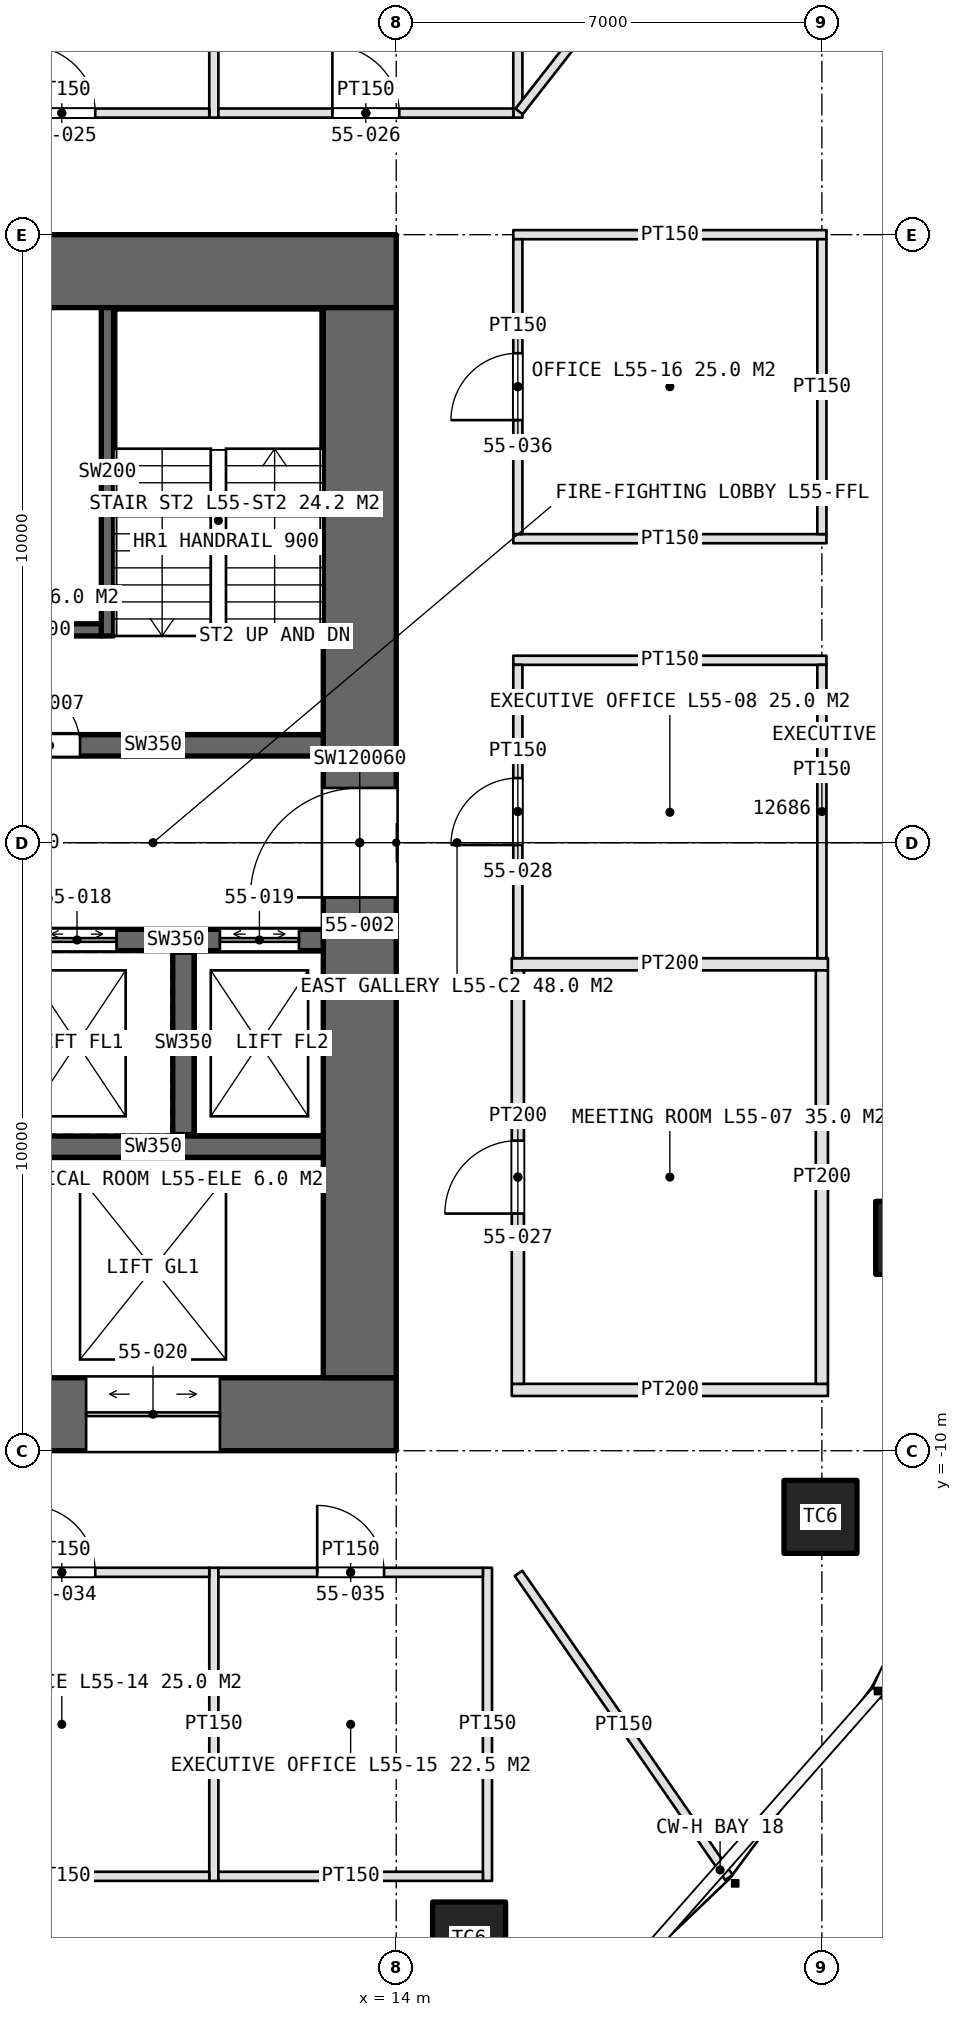
"""IFC4 building model, lengths in metres.
Left out: names, types, materials, properties, quantities, classifications, styles, units other than length and angle.
Written with IfcOpenShell. Run it as: python <this file> out.ifc"""

import sys

from ifc_helpers import new_model, si_unit, direction, frame, frame_2d, origin, origin_2d, place, context, subcontext, project, spatial, rectangle, extrude, element, fill, save


model = new_model("IFC4")
c1 = context("Model", 3, precision=1e-05, world=origin(), true_north=direction((0.0, 1.0)))
c2 = subcontext(c1, "Body", "Model", "MODEL_VIEW")
j1 = project(units=[si_unit("LENGTHUNIT", "METRE"), si_unit("PLANEANGLEUNIT", "RADIAN")], contexts=[c1])
p1 = place(None, origin())
s1 = spatial("IfcSite", under=j1, at=p1, CompositionType="ELEMENT")
p2 = place(p1, origin())
s2 = spatial("IfcBuilding", under=s1, at=p2, CompositionType="ELEMENT")
p3 = place(p2, frame((0.0, 0.0, 249.4)))
s3 = spatial("IfcBuildingStorey", under=s2, at=p3, CompositionType="ELEMENT", Elevation=249.4)
p4 = place(p3, frame((-14.0, -9.4, 0.0), z_axis=(0.0, 0.0, 1.0), x_axis=(1.0, 0.0, 0.0)))
e1 = element("IfcWall", 1, at=p4, inside=s3, PredefinedType="SHEAR", context=c2, shape_type="SweptSolid", body=[
    extrude(rectangle(XDim=28.0, YDim=1.2, at=frame_2d((14.0, 0.0))), origin(), (0.0, 0.0, 1.0), 4.2),
])
p5 = place(p4, frame((22.9, 0.0, 0.0)))
e2 = element("IfcOpeningElement", 2, at=p5, cuts=e1, PredefinedType="OPENING", context=c2, shape_type="SweptSolid", body=[
    extrude(rectangle(XDim=2.2, YDim=2.7, at=frame_2d((1.1, 1.35))), frame((0.0, 0.61, 0.0), z_axis=(0.0, -1.0, 0.0), x_axis=(1.0, 0.0, 0.0)), (0.0, 0.0, 1.0), 1.22),
])
p6 = place(p3, frame((14.0, 9.4, 0.0), z_axis=(0.0, 0.0, 1.0), x_axis=(-1.0, 0.0, 0.0)))
e3 = element("IfcWall", 3, at=p6, inside=s3, PredefinedType="SHEAR", context=c2, shape_type="SweptSolid", body=[
    extrude(rectangle(XDim=28.0, YDim=1.2, at=frame_2d((14.0, 0.0))), origin(), (0.0, 0.0, 1.0), 4.2),
])
p7 = place(p6, frame((24.0, 0.0, 0.0)))
e4 = element("IfcOpeningElement", 4, at=p7, cuts=e3, PredefinedType="OPENING", context=c2, shape_type="SweptSolid", body=[
    extrude(rectangle(XDim=1.0, YDim=2.4, at=frame_2d((0.5, 1.2))), frame((0.0, 0.61, 0.0), z_axis=(0.0, -1.0, 0.0), x_axis=(1.0, 0.0, 0.0)), (0.0, 0.0, 1.0), 1.22),
])
p8 = place(p3, frame((13.4, -8.8, 0.0), z_axis=(0.0, 0.0, 1.0), x_axis=(0.0, 1.0, 0.0)))
e5 = element("IfcWall", 5, at=p8, inside=s3, PredefinedType="SHEAR", context=c2, shape_type="SweptSolid", body=[
    extrude(rectangle(XDim=17.6, YDim=1.2, at=frame_2d((8.8, 0.0))), origin(), (0.0, 0.0, 1.0), 4.2),
])
p9 = place(p8, frame((7.9, 0.0, 0.0)))
e6 = element("IfcOpeningElement", 6, at=p9, cuts=e5, PredefinedType="OPENING", context=c2, shape_type="SweptSolid", body=[
    extrude(rectangle(XDim=1.8, YDim=2.4, at=frame_2d((0.9, 1.2))), frame((0.0, 0.61, 0.0), z_axis=(0.0, -1.0, 0.0), x_axis=(1.0, 0.0, 0.0)), (0.0, 0.0, 1.0), 1.22),
])
p10 = place(p3, frame((7.2, 1.6, 0.0), z_axis=(0.0, 0.0, 1.0), x_axis=(1.0, 0.0, 0.0)))
e7 = element("IfcWall", 7, at=p10, inside=s3, PredefinedType="SHEAR", context=c2, shape_type="SweptSolid", body=[
    extrude(rectangle(XDim=5.6, YDim=0.35, at=frame_2d((2.8, 0.0))), origin(), (0.0, 0.0, 1.0), 4.2),
])
p11 = place(p10, frame((0.6, 0.0, 0.0)))
e8 = element("IfcOpeningElement", 8, at=p11, cuts=e7, PredefinedType="OPENING", context=c2, shape_type="SweptSolid", body=[
    extrude(rectangle(XDim=1.0, YDim=2.4, at=frame_2d((0.5, 1.2))), frame((0.0, 0.185, 0.0), z_axis=(0.0, -1.0, 0.0), x_axis=(1.0, 0.0, 0.0)), (0.0, 0.0, 1.0), 0.37),
])
p12 = place(p3, frame((7.2, -1.6, 0.0), z_axis=(0.0, 0.0, 1.0), x_axis=(1.0, 0.0, 0.0)))
e9 = element("IfcWall", 9, at=p12, inside=s3, PredefinedType="SHEAR", context=c2, shape_type="SweptSolid", body=[
    extrude(rectangle(XDim=5.6, YDim=0.35, at=frame_2d((2.8, 0.0))), origin(), (0.0, 0.0, 1.0), 4.2),
])
p13 = place(p12, frame((0.9, 0.0, 0.0)))
e10 = element("IfcOpeningElement", 10, at=p13, cuts=e9, PredefinedType="OPENING", context=c2, shape_type="SweptSolid", body=[
    extrude(rectangle(XDim=1.3, YDim=2.4, at=frame_2d((0.65, 1.2))), frame((0.0, 0.185, 0.0), z_axis=(0.0, -1.0, 0.0), x_axis=(1.0, 0.0, 0.0)), (0.0, 0.0, 1.0), 0.37),
])
p14 = place(p12, frame((3.9, 0.0, 0.0)))
e11 = element("IfcOpeningElement", 11, at=p14, cuts=e9, PredefinedType="OPENING", context=c2, shape_type="SweptSolid", body=[
    extrude(rectangle(XDim=1.3, YDim=2.4, at=frame_2d((0.65, 1.2))), frame((0.0, 0.185, 0.0), z_axis=(0.0, -1.0, 0.0), x_axis=(1.0, 0.0, 0.0)), (0.0, 0.0, 1.0), 0.37),
])
p15 = place(p3, frame((10.5, -4.8, 0.0), z_axis=(0.0, 0.0, 1.0), x_axis=(0.0, 1.0, 0.0)))
e12 = element("IfcWall", 12, at=p15, inside=s3, PredefinedType="SHEAR", context=c2, shape_type="SweptSolid", body=[
    extrude(rectangle(XDim=3.0, YDim=0.35, at=frame_2d((1.5, 0.0))), origin(), (0.0, 0.0, 1.0), 4.2),
])
p16 = place(p3, frame((7.2, -5.0, 0.0), z_axis=(0.0, 0.0, 1.0), x_axis=(1.0, 0.0, 0.0)))
e13 = element("IfcWall", 13, at=p16, inside=s3, PredefinedType="SHEAR", context=c2, shape_type="SweptSolid", body=[
    extrude(rectangle(XDim=5.6, YDim=0.35, at=frame_2d((2.8, 0.0))), origin(), (0.0, 0.0, 1.0), 4.2),
])
for number, where, z_axis, x_axis in (
    (14, (15.198, -18.023, 0.0), (0.0, 0.0, 1.0), (1.0, 0.0, 0.0)),
    (15, (20.977, -11.088, 0.0), (0.0, 0.0, 1.0), (1.0, 0.0, 0.0)),
    (16, (22.485, -6.499, 0.0), (0.0, 0.0, 1.0), (1.0, 0.0, 0.0)),
):
    element("IfcColumn", number, at=place(p3, frame(where, z_axis=z_axis, x_axis=x_axis)), inside=s3, PredefinedType="COLUMN", context=c2, shape_type="SweptSolid", body=[
        extrude(rectangle(XDim=1.2, YDim=1.2, at=origin_2d()), origin(), (0.0, 0.0, 1.0), 4.2),
    ])
p17 = place(p3, frame((9.25, 3.4, 0.0), z_axis=(0.0, 0.0, 1.0), x_axis=(0.0, 1.0, 0.0)))
e17 = element("IfcWall", 17, at=p17, inside=s3, PredefinedType="SOLIDWALL", context=c2, shape_type="SweptSolid", body=[
    extrude(rectangle(XDim=5.4, YDim=0.2, at=frame_2d((2.7, 0.0))), origin(), (0.0, 0.0, 1.0), 4.2),
])
p18 = place(p3, frame((9.15, 3.5, 0.0), z_axis=(0.0, 0.0, 1.0), x_axis=(-1.0, 0.0, 0.0)))
e18 = element("IfcWall", 18, at=p18, inside=s3, PredefinedType="SOLIDWALL", context=c2, shape_type="SweptSolid", body=[
    extrude(rectangle(XDim=1.95, YDim=0.2, at=frame_2d((0.975, 0.0))), origin(), (0.0, 0.0, 1.0), 4.2),
])
for number, where, z_axis, x_axis in (
    (19, (11.0, 11.925, 0.0), (0.0, 0.0, 1.0), (0.0, 1.0, 0.0)),
    (20, (16.0, 11.925, 0.0), (0.0, 0.0, 1.0), (0.0, 1.0, 0.0)),
):
    element("IfcWall", number, at=place(p3, frame(where, z_axis=z_axis, x_axis=x_axis)), inside=s3, PredefinedType="PARTITIONING", context=c2, shape_type="SweptSolid", body=[
        extrude(rectangle(XDim=6.15, YDim=0.15, at=frame_2d((3.075, 0.0))), origin(), (0.0, 0.0, 1.0), 3.0),
    ])
p19 = place(p3, frame((6.075, 12.0, 0.0), z_axis=(0.0, 0.0, 1.0), x_axis=(1.0, 0.0, 0.0)))
e21 = element("IfcWall", 21, at=p19, inside=s3, PredefinedType="PARTITIONING", context=c2, shape_type="SweptSolid", body=[
    extrude(rectangle(XDim=4.85, YDim=0.15, at=frame_2d((2.425, 0.0))), origin(), (0.0, 0.0, 1.0), 3.0),
])
p20 = place(p19, frame((1.875, 0.0, 0.0)))
e22 = element("IfcOpeningElement", 22, at=p20, cuts=e21, PredefinedType="OPENING", context=c2, shape_type="SweptSolid", body=[
    extrude(rectangle(XDim=1.1, YDim=2.3, at=frame_2d((0.55, 1.15))), frame((0.0, 0.085, 0.0), z_axis=(0.0, -1.0, 0.0), x_axis=(1.0, 0.0, 0.0)), (0.0, 0.0, 1.0), 0.17),
])
p21 = place(p3, frame((11.075, 12.0, 0.0), z_axis=(0.0, 0.0, 1.0), x_axis=(1.0, 0.0, 0.0)))
e23 = element("IfcWall", 23, at=p21, inside=s3, PredefinedType="PARTITIONING", context=c2, shape_type="SweptSolid", body=[
    extrude(rectangle(XDim=4.85, YDim=0.15, at=frame_2d((2.425, 0.0))), origin(), (0.0, 0.0, 1.0), 3.0),
])
p22 = place(p21, frame((1.875, 0.0, 0.0)))
e24 = element("IfcOpeningElement", 24, at=p22, cuts=e23, PredefinedType="OPENING", context=c2, shape_type="SweptSolid", body=[
    extrude(rectangle(XDim=1.1, YDim=2.3, at=frame_2d((0.55, 1.15))), frame((0.0, 0.085, 0.0), z_axis=(0.0, -1.0, 0.0), x_axis=(1.0, 0.0, 0.0)), (0.0, 0.0, 1.0), 0.17),
])
for number, where, z_axis, x_axis in (
    (25, (15.9, -9.0, 0.0), (0.0, 0.0, 1.0), (1.0, 0.0, 0.0)),
    (26, (15.9, -2.0, 0.0), (0.0, 0.0, 1.0), (1.0, 0.0, 0.0)),
):
    element("IfcWall", number, at=place(p3, frame(where, z_axis=z_axis, x_axis=x_axis)), inside=s3, PredefinedType="PARTITIONING", context=c2, shape_type="SweptSolid", body=[
        extrude(rectangle(XDim=5.2, YDim=0.2, at=frame_2d((2.6, 0.0))), origin(), (0.0, 0.0, 1.0), 3.0),
    ])
p23 = place(p3, frame((15.925, 3.0, 0.0), z_axis=(0.0, 0.0, 1.0), x_axis=(1.0, 0.0, 0.0)))
e27 = element("IfcWall", 27, at=p23, inside=s3, PredefinedType="PARTITIONING", context=c2, shape_type="SweptSolid", body=[
    extrude(rectangle(XDim=5.15, YDim=0.15, at=frame_2d((2.575, 0.0))), origin(), (0.0, 0.0, 1.0), 3.0),
])
p24 = place(p3, frame((16.0, -8.9, 0.0), z_axis=(0.0, 0.0, 1.0), x_axis=(0.0, 1.0, 0.0)))
e28 = element("IfcWall", 28, at=p24, inside=s3, PredefinedType="PARTITIONING", context=c2, shape_type="SweptSolid", body=[
    extrude(rectangle(XDim=6.8, YDim=0.2, at=frame_2d((3.4, 0.0))), origin(), (0.0, 0.0, 1.0), 3.0),
])
p25 = place(p24, frame((2.8, 0.0, 0.0)))
e29 = element("IfcOpeningElement", 29, at=p25, cuts=e28, PredefinedType="OPENING", context=c2, shape_type="SweptSolid", body=[
    extrude(rectangle(XDim=1.2, YDim=2.4, at=frame_2d((0.6, 1.2))), frame((0.0, 0.11, 0.0), z_axis=(0.0, -1.0, 0.0), x_axis=(1.0, 0.0, 0.0)), (0.0, 0.0, 1.0), 0.22),
])
p26 = place(p3, frame((21.0, -8.9, 0.0), z_axis=(0.0, 0.0, 1.0), x_axis=(0.0, 1.0, 0.0)))
e30 = element("IfcWall", 30, at=p26, inside=s3, PredefinedType="PARTITIONING", context=c2, shape_type="SweptSolid", body=[
    extrude(rectangle(XDim=6.8, YDim=0.2, at=frame_2d((3.4, 0.0))), origin(), (0.0, 0.0, 1.0), 3.0),
])
p27 = place(p3, frame((16.0, -1.9, 0.0), z_axis=(0.0, 0.0, 1.0), x_axis=(0.0, 1.0, 0.0)))
e31 = element("IfcWall", 31, at=p27, inside=s3, PredefinedType="PARTITIONING", context=c2, shape_type="SweptSolid", body=[
    extrude(rectangle(XDim=4.825, YDim=0.15, at=frame_2d((2.413, 0.0))), origin(), (0.0, 0.0, 1.0), 3.0),
])
p28 = place(p27, frame((1.863, 0.0, 0.0)))
e32 = element("IfcOpeningElement", 32, at=p28, cuts=e31, PredefinedType="OPENING", context=c2, shape_type="SweptSolid", body=[
    extrude(rectangle(XDim=1.1, YDim=2.3, at=frame_2d((0.55, 1.15))), frame((0.0, 0.085, 0.0), z_axis=(0.0, -1.0, 0.0), x_axis=(1.0, 0.0, 0.0)), (0.0, 0.0, 1.0), 0.17),
])
p29 = place(p3, frame((21.0, -1.9, 0.0), z_axis=(0.0, 0.0, 1.0), x_axis=(0.0, 1.0, 0.0)))
e33 = element("IfcWall", 33, at=p29, inside=s3, PredefinedType="PARTITIONING", context=c2, shape_type="SweptSolid", body=[
    extrude(rectangle(XDim=4.825, YDim=0.15, at=frame_2d((2.413, 0.0))), origin(), (0.0, 0.0, 1.0), 3.0),
])
for number, where, z_axis, x_axis in (
    (34, (11.0, -11.925, 0.0), (0.0, 0.0, 1.0), (0.0, -1.0, 0.0)),
    (35, (15.5, -11.925, 0.0), (0.0, 0.0, 1.0), (0.0, -1.0, 0.0)),
):
    element("IfcWall", number, at=place(p3, frame(where, z_axis=z_axis, x_axis=x_axis)), inside=s3, PredefinedType="PARTITIONING", context=c2, shape_type="SweptSolid", body=[
        extrude(rectangle(XDim=5.15, YDim=0.15, at=frame_2d((2.575, 0.0))), origin(), (0.0, 0.0, 1.0), 3.0),
    ])
p30 = place(p3, frame((6.075, -12.0, 0.0), z_axis=(0.0, 0.0, 1.0), x_axis=(1.0, 0.0, 0.0)))
e36 = element("IfcWall", 36, at=p30, inside=s3, PredefinedType="PARTITIONING", context=c2, shape_type="SweptSolid", body=[
    extrude(rectangle(XDim=4.85, YDim=0.15, at=frame_2d((2.425, 0.0))), origin(), (0.0, 0.0, 1.0), 3.0),
])
p31 = place(p30, frame((1.875, 0.0, 0.0)))
e37 = element("IfcOpeningElement", 37, at=p31, cuts=e36, PredefinedType="OPENING", context=c2, shape_type="SweptSolid", body=[
    extrude(rectangle(XDim=1.1, YDim=2.3, at=frame_2d((0.55, 1.15))), frame((0.0, 0.085, 0.0), z_axis=(0.0, -1.0, 0.0), x_axis=(1.0, 0.0, 0.0)), (0.0, 0.0, 1.0), 0.17),
])
p32 = place(p3, frame((6.075, -17.0, 0.0), z_axis=(0.0, 0.0, 1.0), x_axis=(1.0, 0.0, 0.0)))
e38 = element("IfcWall", 38, at=p32, inside=s3, PredefinedType="PARTITIONING", context=c2, shape_type="SweptSolid", body=[
    extrude(rectangle(XDim=4.85, YDim=0.15, at=frame_2d((2.425, 0.0))), origin(), (0.0, 0.0, 1.0), 3.0),
])
p33 = place(p3, frame((11.075, -12.0, 0.0), z_axis=(0.0, 0.0, 1.0), x_axis=(1.0, 0.0, 0.0)))
e39 = element("IfcWall", 39, at=p33, inside=s3, PredefinedType="PARTITIONING", context=c2, shape_type="SweptSolid", body=[
    extrude(rectangle(XDim=4.35, YDim=0.15, at=frame_2d((2.175, 0.0))), origin(), (0.0, 0.0, 1.0), 3.0),
])
p34 = place(p33, frame((1.625, 0.0, 0.0)))
e40 = element("IfcOpeningElement", 40, at=p34, cuts=e39, PredefinedType="OPENING", context=c2, shape_type="SweptSolid", body=[
    extrude(rectangle(XDim=1.1, YDim=2.3, at=frame_2d((0.55, 1.15))), frame((0.0, 0.085, 0.0), z_axis=(0.0, -1.0, 0.0), x_axis=(1.0, 0.0, 0.0)), (0.0, 0.0, 1.0), 0.17),
])
p35 = place(p3, frame((11.075, -17.0, 0.0), z_axis=(0.0, 0.0, 1.0), x_axis=(1.0, 0.0, 0.0)))
e41 = element("IfcWall", 41, at=p35, inside=s3, PredefinedType="PARTITIONING", context=c2, shape_type="SweptSolid", body=[
    extrude(rectangle(XDim=4.35, YDim=0.15, at=frame_2d((2.175, 0.0))), origin(), (0.0, 0.0, 1.0), 3.0),
])
for number, where, z_axis, x_axis in (
    (42, (15.925, 5.0, 0.0), (0.0, 0.0, 1.0), (1.0, 0.0, 0.0)),
    (43, (15.925, 10.0, 0.0), (0.0, 0.0, 1.0), (1.0, 0.0, 0.0)),
):
    element("IfcWall", number, at=place(p3, frame(where, z_axis=z_axis, x_axis=x_axis)), inside=s3, PredefinedType="PARTITIONING", context=c2, shape_type="SweptSolid", body=[
        extrude(rectangle(XDim=5.15, YDim=0.15, at=frame_2d((2.575, 0.0))), origin(), (0.0, 0.0, 1.0), 3.0),
    ])
p36 = place(p3, frame((16.0, 5.075, 0.0), z_axis=(0.0, 0.0, 1.0), x_axis=(0.0, 1.0, 0.0)))
e44 = element("IfcWall", 44, at=p36, inside=s3, PredefinedType="PARTITIONING", context=c2, shape_type="SweptSolid", body=[
    extrude(rectangle(XDim=4.85, YDim=0.15, at=frame_2d((2.425, 0.0))), origin(), (0.0, 0.0, 1.0), 3.0),
])
p37 = place(p36, frame((1.875, 0.0, 0.0)))
e45 = element("IfcOpeningElement", 45, at=p37, cuts=e44, PredefinedType="OPENING", context=c2, shape_type="SweptSolid", body=[
    extrude(rectangle(XDim=1.1, YDim=2.3, at=frame_2d((0.55, 1.15))), frame((0.0, 0.085, 0.0), z_axis=(0.0, -1.0, 0.0), x_axis=(1.0, 0.0, 0.0)), (0.0, 0.0, 1.0), 0.17),
])
p38 = place(p3, frame((21.0, 5.075, 0.0), z_axis=(0.0, 0.0, 1.0), x_axis=(0.0, 1.0, 0.0)))
e46 = element("IfcWall", 46, at=p38, inside=s3, PredefinedType="PARTITIONING", context=c2, shape_type="SweptSolid", body=[
    extrude(rectangle(XDim=4.85, YDim=0.15, at=frame_2d((2.425, 0.0))), origin(), (0.0, 0.0, 1.0), 3.0),
])
p39 = place(p3, frame((16.011, -12.016, 0.0), z_axis=(0.0, 0.0, 1.0), x_axis=(0.568863489071, -0.822431961199, 0.0)))
e47 = element("IfcWall", 47, at=p39, inside=s3, PredefinedType="PARTITIONING", context=c2, shape_type="SweptSolid", body=[
    extrude(rectangle(XDim=6.083, YDim=0.15, at=frame_2d((3.042, 0.0))), origin(), (0.0, 0.0, 1.0), 3.0),
])
p40 = place(p3, frame((16.02, 12.026, 0.0), z_axis=(0.0, 0.0, 1.0), x_axis=(0.616031272047, 0.787721696959, 0.0)))
e48 = element("IfcWall", 48, at=p40, inside=s3, PredefinedType="PARTITIONING", context=c2, shape_type="SweptSolid", body=[
    extrude(rectangle(XDim=7.939, YDim=0.15, at=frame_2d((3.969, 0.0))), origin(), (0.0, 0.0, 1.0), 3.0),
])
p41 = place(p9, origin())
e49 = element("IfcDoor", 49, at=p41, inside=s3, OperationType="DOUBLE_DOOR_SINGLE_SWING", PredefinedType="DOOR", context=c2, shape_type="SweptSolid", body=[
    extrude(rectangle(XDim=1.8, YDim=2.4, at=frame_2d((0.9, 1.2))), frame((0.0, 0.025, 0.0), z_axis=(0.0, -1.0, 0.0), x_axis=(1.0, 0.0, 0.0)), (0.0, 0.0, 1.0), 0.05),
])
fill(e6, e49)
p42 = place(p11, origin())
e50 = element("IfcDoor", 50, at=p42, inside=s3, OperationType="SINGLE_SWING_LEFT", PredefinedType="DOOR", context=c2, shape_type="SweptSolid", body=[
    extrude(rectangle(XDim=1.0, YDim=2.4, at=frame_2d((0.5, 1.2))), frame((0.0, 0.025, 0.0), z_axis=(0.0, -1.0, 0.0), x_axis=(1.0, 0.0, 0.0)), (0.0, 0.0, 1.0), 0.05),
])
fill(e8, e50)
p43 = place(p13, origin())
e51 = element("IfcDoor", 51, at=p43, inside=s3, OperationType="DOUBLE_DOOR_SLIDING", PredefinedType="DOOR", context=c2, shape_type="SweptSolid", body=[
    extrude(rectangle(XDim=1.3, YDim=2.4, at=frame_2d((0.65, 1.2))), frame((0.0, 0.025, 0.0), z_axis=(0.0, -1.0, 0.0), x_axis=(1.0, 0.0, 0.0)), (0.0, 0.0, 1.0), 0.05),
])
fill(e10, e51)
p44 = place(p14, origin())
e52 = element("IfcDoor", 52, at=p44, inside=s3, OperationType="DOUBLE_DOOR_SLIDING", PredefinedType="DOOR", context=c2, shape_type="SweptSolid", body=[
    extrude(rectangle(XDim=1.3, YDim=2.4, at=frame_2d((0.65, 1.2))), frame((0.0, 0.025, 0.0), z_axis=(0.0, -1.0, 0.0), x_axis=(1.0, 0.0, 0.0)), (0.0, 0.0, 1.0), 0.05),
])
fill(e11, e52)
p45 = place(p5, origin())
e53 = element("IfcDoor", 53, at=p45, inside=s3, OperationType="DOUBLE_DOOR_SLIDING", PredefinedType="DOOR", context=c2, shape_type="SweptSolid", body=[
    extrude(rectangle(XDim=2.2, YDim=2.7, at=frame_2d((1.1, 1.35))), frame((0.0, 0.025, 0.0), z_axis=(0.0, -1.0, 0.0), x_axis=(1.0, 0.0, 0.0)), (0.0, 0.0, 1.0), 0.05),
])
fill(e2, e53)
p46 = place(p20, origin())
e54 = element("IfcDoor", 54, at=p46, inside=s3, OperationType="SINGLE_SWING_LEFT", PredefinedType="DOOR", context=c2, shape_type="SweptSolid", body=[
    extrude(rectangle(XDim=1.1, YDim=2.3, at=frame_2d((0.55, 1.15))), frame((0.0, 0.025, 0.0), z_axis=(0.0, -1.0, 0.0), x_axis=(1.0, 0.0, 0.0)), (0.0, 0.0, 1.0), 0.05),
])
fill(e22, e54)
p47 = place(p22, origin())
e55 = element("IfcDoor", 55, at=p47, inside=s3, OperationType="SINGLE_SWING_LEFT", PredefinedType="DOOR", context=c2, shape_type="SweptSolid", body=[
    extrude(rectangle(XDim=1.1, YDim=2.3, at=frame_2d((0.55, 1.15))), frame((0.0, 0.025, 0.0), z_axis=(0.0, -1.0, 0.0), x_axis=(1.0, 0.0, 0.0)), (0.0, 0.0, 1.0), 0.05),
])
fill(e24, e55)
p48 = place(p25, origin())
e56 = element("IfcDoor", 56, at=p48, inside=s3, OperationType="SINGLE_SWING_LEFT", PredefinedType="DOOR", context=c2, shape_type="SweptSolid", body=[
    extrude(rectangle(XDim=1.2, YDim=2.4, at=frame_2d((0.6, 1.2))), frame((0.0, 0.025, 0.0), z_axis=(0.0, -1.0, 0.0), x_axis=(1.0, 0.0, 0.0)), (0.0, 0.0, 1.0), 0.05),
])
fill(e29, e56)
p49 = place(p28, origin())
e57 = element("IfcDoor", 57, at=p49, inside=s3, OperationType="SINGLE_SWING_LEFT", PredefinedType="DOOR", context=c2, shape_type="SweptSolid", body=[
    extrude(rectangle(XDim=1.1, YDim=2.3, at=frame_2d((0.55, 1.15))), frame((0.0, 0.025, 0.0), z_axis=(0.0, -1.0, 0.0), x_axis=(1.0, 0.0, 0.0)), (0.0, 0.0, 1.0), 0.05),
])
fill(e32, e57)
p50 = place(p31, origin())
e58 = element("IfcDoor", 58, at=p50, inside=s3, OperationType="SINGLE_SWING_LEFT", PredefinedType="DOOR", context=c2, shape_type="SweptSolid", body=[
    extrude(rectangle(XDim=1.1, YDim=2.3, at=frame_2d((0.55, 1.15))), frame((0.0, 0.025, 0.0), z_axis=(0.0, -1.0, 0.0), x_axis=(1.0, 0.0, 0.0)), (0.0, 0.0, 1.0), 0.05),
])
fill(e37, e58)
p51 = place(p34, origin())
e59 = element("IfcDoor", 59, at=p51, inside=s3, OperationType="SINGLE_SWING_LEFT", PredefinedType="DOOR", context=c2, shape_type="SweptSolid", body=[
    extrude(rectangle(XDim=1.1, YDim=2.3, at=frame_2d((0.55, 1.15))), frame((0.0, 0.025, 0.0), z_axis=(0.0, -1.0, 0.0), x_axis=(1.0, 0.0, 0.0)), (0.0, 0.0, 1.0), 0.05),
])
fill(e40, e59)
p52 = place(p37, origin())
e60 = element("IfcDoor", 60, at=p52, inside=s3, OperationType="SINGLE_SWING_LEFT", PredefinedType="DOOR", context=c2, shape_type="SweptSolid", body=[
    extrude(rectangle(XDim=1.1, YDim=2.3, at=frame_2d((0.55, 1.15))), frame((0.0, 0.025, 0.0), z_axis=(0.0, -1.0, 0.0), x_axis=(1.0, 0.0, 0.0)), (0.0, 0.0, 1.0), 0.05),
])
fill(e45, e60)
save(model, sys.argv[1])
